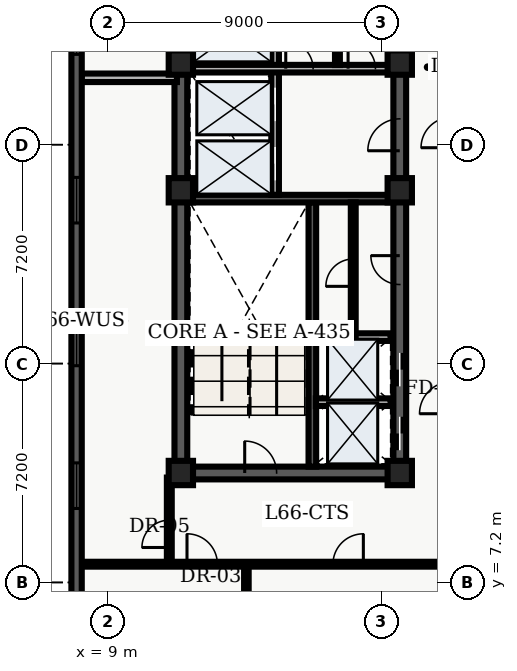
"""IFC4 building model, lengths in metres.
Left out: names, types, materials, properties, quantities, classifications, styles, units other than length and angle.
Written with IfcOpenShell. Run it as: python <this file> out.ifc"""

import sys

from ifc_helpers import new_model, entity, si_unit, converted_unit, direction, frame, origin_with_axes, origin_2d_with_axis, place, context, subcontext, project, spatial, polyline, rectangle, outline, extrude, element, fill, save


model = new_model("IFC4")
c1 = context("Model", 3, precision=1e-05, world=origin_with_axes(), true_north=direction((0.0, 1.0)))
c2 = subcontext(c1, "Body", "Model", "MODEL_VIEW")
j1 = project(units=[si_unit("LENGTHUNIT", "METRE"), converted_unit("PLANEANGLEUNIT", "DEGREE", entity("IfcPlaneAngleMeasure", 0.017), si_unit("PLANEANGLEUNIT", "RADIAN"), dimensions=[0, 0, 0, 0, 0, 0, 0])], contexts=[c1])
p1 = place(None, origin_with_axes())
s1 = spatial("IfcSite", under=j1, at=p1, CompositionType="ELEMENT")
p2 = place(p1, origin_with_axes())
s2 = spatial("IfcBuilding", under=s1, at=p2, CompositionType="ELEMENT")
p3 = place(p2, frame((0.0, 0.0, 268.5), z_axis=(0.0, 0.0, 1.0), x_axis=(1.0, 0.0, 0.0)))
s3 = spatial("IfcBuildingStorey", under=s2, at=p3, CompositionType="ELEMENT", Elevation=268.5)
p4 = place(p3, frame((11.4, 10.8, 0.0), z_axis=(0.0, 0.0, 1.0), x_axis=(0.0, 1.0, 0.0)))
e1 = element("IfcWall", 1, at=p4, inside=s3, PredefinedType="SHEAR", context=c2, shape_type="SweptSolid", body=[
    extrude(outline(polyline([(0.0, -0.21), (27.0, -0.21), (27.0, 0.21), (0.0, 0.21), (0.0, -0.21)])), origin_with_axes(), (0.0, 0.0, 1.0), 3.66),
])
p5 = place(p3, frame((11.4, 10.8, 0.0), z_axis=(0.0, 0.0, 1.0), x_axis=(1.0, 0.0, 0.0)))
e2 = element("IfcWall", 2, at=p5, inside=s3, PredefinedType="SHEAR", context=c2, shape_type="SweptSolid", body=[
    extrude(outline(polyline([(0.0, -0.21), (7.2, -0.21), (7.2, 0.21), (0.0, 0.21), (0.0, -0.21)])), origin_with_axes(), (0.0, 0.0, 1.0), 3.66),
])
p6 = place(p5, frame((2.625, 0.0, 0.0), z_axis=(0.0, 0.0, 1.0), x_axis=(1.0, 0.0, 0.0)))
e3 = element("IfcOpeningElement", 3, at=p6, cuts=e2, PredefinedType="OPENING", context=c2, shape_type="SweptSolid", body=[
    extrude(rectangle(XDim=1.05, YDim=0.44, at=origin_2d_with_axis()), origin_with_axes(), (0.0, 0.0, 1.0), 2.15),
])
p7 = place(p3, frame((18.6, 10.8, 0.0), z_axis=(0.0, 0.0, 1.0), x_axis=(0.0, 1.0, 0.0)))
e4 = element("IfcWall", 4, at=p7, inside=s3, PredefinedType="SHEAR", context=c2, shape_type="SweptSolid", body=[
    extrude(outline(polyline([(0.0, -0.21), (13.5, -0.21), (13.5, 0.21), (0.0, 0.21), (0.0, -0.21)])), origin_with_axes(), (0.0, 0.0, 1.0), 3.66),
])
p8 = place(p7, frame((1.3, 0.0, 0.0), z_axis=(0.0, 0.0, 1.0), x_axis=(1.0, 0.0, 0.0)))
e5 = element("IfcOpeningElement", 5, at=p8, cuts=e4, PredefinedType="OPENING", context=c2, shape_type="SweptSolid", body=[
    extrude(rectangle(XDim=1.1, YDim=0.44, at=origin_2d_with_axis()), origin_with_axes(), (0.0, 0.0, 1.0), 2.15),
])
p9 = place(p7, frame((3.4, 0.0, 0.0), z_axis=(0.0, 0.0, 1.0), x_axis=(1.0, 0.0, 0.0)))
e6 = element("IfcOpeningElement", 6, at=p9, cuts=e4, PredefinedType="OPENING", context=c2, shape_type="SweptSolid", body=[
    extrude(rectangle(XDim=1.1, YDim=0.44, at=origin_2d_with_axis()), origin_with_axes(), (0.0, 0.0, 1.0), 2.15),
])
p10 = place(p7, frame((11.125, 0.0, 0.0), z_axis=(0.0, 0.0, 1.0), x_axis=(1.0, 0.0, 0.0)))
e7 = element("IfcOpeningElement", 7, at=p10, cuts=e4, PredefinedType="OPENING", context=c2, shape_type="SweptSolid", body=[
    extrude(rectangle(XDim=1.05, YDim=0.44, at=origin_2d_with_axis()), origin_with_axes(), (0.0, 0.0, 1.0), 2.15),
])
p11 = place(p7, frame((6.675, 0.0, 0.0), z_axis=(0.0, 0.0, 1.0), x_axis=(1.0, 0.0, 0.0)))
e8 = element("IfcOpeningElement", 8, at=p11, cuts=e4, PredefinedType="OPENING", context=c2, shape_type="SweptSolid", body=[
    extrude(rectangle(XDim=0.95, YDim=0.44, at=origin_2d_with_axis()), origin_with_axes(), (0.0, 0.0, 1.0), 2.15),
])
p12 = place(p3, frame((18.6, 24.3, 0.0), z_axis=(0.0, 0.0, 1.0), x_axis=(0.0, 1.0, 0.0)))
e9 = element("IfcWall", 9, at=p12, inside=s3, PredefinedType="SHEAR", context=c2, shape_type="SweptSolid", body=[
    extrude(outline(polyline([(0.0, -0.21), (13.5, -0.21), (13.5, 0.21), (0.0, 0.21), (0.0, -0.21)])), origin_with_axes(), (0.0, 0.0, 1.0), 3.66),
])
p13 = place(p12, frame((6.725, 0.0, 0.0), z_axis=(0.0, 0.0, 1.0), x_axis=(1.0, 0.0, 0.0)))
e10 = element("IfcOpeningElement", 10, at=p13, cuts=e9, PredefinedType="OPENING", context=c2, shape_type="SweptSolid", body=[
    extrude(rectangle(XDim=1.05, YDim=0.44, at=origin_2d_with_axis()), origin_with_axes(), (0.0, 0.0, 1.0), 2.15),
])
p14 = place(p12, frame((11.125, 0.0, 0.0), z_axis=(0.0, 0.0, 1.0), x_axis=(1.0, 0.0, 0.0)))
e11 = element("IfcOpeningElement", 11, at=p14, cuts=e9, PredefinedType="OPENING", context=c2, shape_type="SweptSolid", body=[
    extrude(rectangle(XDim=1.05, YDim=0.44, at=origin_2d_with_axis()), origin_with_axes(), (0.0, 0.0, 1.0), 2.15),
])
p15 = place(p3, frame((15.725, 11.01, 0.0), z_axis=(0.0, 0.0, 1.0), x_axis=(0.0, 1.0, 0.0)))
e12 = element("IfcWall", 12, at=p15, inside=s3, PredefinedType="SHEAR", context=c2, shape_type="SweptSolid", body=[
    extrude(outline(polyline([(0.0, -0.125), (8.69, -0.125), (8.69, 0.125), (0.0, 0.125), (0.0, -0.125)])), origin_with_axes(), (0.0, 0.0, 1.0), 3.66),
])
p16 = place(p3, frame((11.61, 19.825, 0.0), z_axis=(0.0, 0.0, 1.0), x_axis=(1.0, 0.0, 0.0)))
e13 = element("IfcWall", 13, at=p16, inside=s3, PredefinedType="SHEAR", context=c2, shape_type="SweptSolid", body=[
    extrude(outline(polyline([(0.0, -0.125), (6.78, -0.125), (6.78, 0.125), (0.0, 0.125), (0.0, -0.125)])), origin_with_axes(), (0.0, 0.0, 1.0), 3.66),
])
p17 = place(p3, frame((14.5, 19.95, 0.0), z_axis=(0.0, 0.0, 1.0), x_axis=(0.0, 1.0, 0.0)))
e14 = element("IfcWall", 14, at=p17, inside=s3, PredefinedType="SOLIDWALL", context=c2, shape_type="SweptSolid", body=[
    extrude(outline(polyline([(0.0, -0.125), (6.25, -0.125), (6.25, 0.125), (0.0, 0.125), (0.0, -0.125)])), origin_with_axes(), (0.0, 0.0, 1.0), 2.7),
])
p18 = place(p17, frame((1.025, 0.0, 0.0), z_axis=(0.0, 0.0, 1.0), x_axis=(1.0, 0.0, 0.0)))
e15 = element("IfcOpeningElement", 15, at=p18, cuts=e14, PredefinedType="OPENING", context=c2, shape_type="SweptSolid", body=[
    extrude(rectangle(XDim=1.1, YDim=0.27, at=origin_2d_with_axis()), origin_with_axes(), (0.0, 0.0, 1.0), 2.15),
])
p19 = place(p17, frame((2.975, 0.0, 0.0), z_axis=(0.0, 0.0, 1.0), x_axis=(1.0, 0.0, 0.0)))
e16 = element("IfcOpeningElement", 16, at=p19, cuts=e14, PredefinedType="OPENING", context=c2, shape_type="SweptSolid", body=[
    extrude(rectangle(XDim=1.1, YDim=0.27, at=origin_2d_with_axis()), origin_with_axes(), (0.0, 0.0, 1.0), 2.15),
])
p20 = place(p17, frame((5.425, 0.0, 0.0), z_axis=(0.0, 0.0, 1.0), x_axis=(1.0, 0.0, 0.0)))
e17 = element("IfcOpeningElement", 17, at=p20, cuts=e14, PredefinedType="OPENING", context=c2, shape_type="SweptSolid", body=[
    extrude(rectangle(XDim=1.2, YDim=0.27, at=origin_2d_with_axis()), origin_with_axes(), (0.0, 0.0, 1.0), 2.15),
])
p21 = place(p3, frame((11.7, 24.1, 0.0), z_axis=(0.0, 0.0, 1.0), x_axis=(1.0, 0.0, 0.0)))
e18 = element("IfcWall", 18, at=p21, inside=s3, PredefinedType="SOLIDWALL", context=c2, shape_type="SweptSolid", body=[
    extrude(outline(polyline([(0.0, -0.125), (6.6, -0.125), (6.6, 0.125), (0.0, 0.125), (0.0, -0.125)])), origin_with_axes(), (0.0, 0.0, 1.0), 2.7),
])
p22 = place(p21, frame((3.6, 0.0, 0.0), z_axis=(0.0, 0.0, 1.0), x_axis=(1.0, 0.0, 0.0)))
e19 = element("IfcOpeningElement", 19, at=p22, cuts=e18, PredefinedType="OPENING", context=c2, shape_type="SweptSolid", body=[
    extrude(rectangle(XDim=0.9, YDim=0.27, at=origin_2d_with_axis()), origin_with_axes(), (0.0, 0.0, 1.0), 2.15),
])
p23 = place(p21, frame((5.65, 0.0, 0.0), z_axis=(0.0, 0.0, 1.0), x_axis=(1.0, 0.0, 0.0)))
e20 = element("IfcOpeningElement", 20, at=p23, cuts=e18, PredefinedType="OPENING", context=c2, shape_type="SweptSolid", body=[
    extrude(rectangle(XDim=0.9, YDim=0.27, at=origin_2d_with_axis()), origin_with_axes(), (0.0, 0.0, 1.0), 2.15),
])
for number, where, z_axis, x_axis in (
    (21, (11.4, 10.8, 0.0), (0.0, 0.0, 1.0), (1.0, 0.0, 0.0)),
    (22, (11.4, 20.1, 0.0), (0.0, 0.0, 1.0), (1.0, 0.0, 0.0)),
    (23, (11.4, 24.3, 0.0), (0.0, 0.0, 1.0), (1.0, 0.0, 0.0)),
    (24, (18.6, 10.8, 0.0), (0.0, 0.0, 1.0), (1.0, 0.0, 0.0)),
    (25, (18.6, 20.1, 0.0), (0.0, 0.0, 1.0), (1.0, 0.0, 0.0)),
    (26, (18.6, 24.3, 0.0), (0.0, 0.0, 1.0), (1.0, 0.0, 0.0)),
):
    element("IfcColumn", number, at=place(p3, frame(where, z_axis=z_axis, x_axis=x_axis)), inside=s3, PredefinedType="COLUMN", context=c2, shape_type="SweptSolid", body=[
        extrude(rectangle(XDim=0.8, YDim=0.8, at=origin_2d_with_axis()), origin_with_axes(), (0.0, 0.0, 1.0), 3.9),
    ])
p24 = place(p3, frame((16.55, 24.22, 0.0), z_axis=(0.0, 0.0, 1.0), x_axis=(0.0, 1.0, 0.0)))
e27 = element("IfcWall", 27, at=p24, inside=s3, PredefinedType="PARTITIONING", context=c2, shape_type="SweptSolid", body=[
    extrude(outline(polyline([(0.0, -0.08), (1.98, -0.08), (1.98, 0.08), (0.0, 0.08), (0.0, -0.08)])), origin_with_axes(), (0.0, 0.0, 1.0), 2.7),
])
for number, where, z_axis, x_axis in (
    (28, (15.84, 13.13, 0.0), (0.0, 0.0, 1.0), (1.0, 0.0, 0.0)),
    (29, (15.84, 15.27, 0.0), (0.0, 0.0, 1.0), (1.0, 0.0, 0.0)),
):
    element("IfcWall", number, at=place(p3, frame(where, z_axis=z_axis, x_axis=x_axis)), inside=s3, PredefinedType="SOLIDWALL", context=c2, shape_type="SweptSolid", body=[
        extrude(outline(polyline([(0.0, -0.125), (2.46, -0.125), (2.46, 0.125), (0.0, 0.125), (0.0, -0.125)])), origin_with_axes(), (0.0, 0.0, 1.0), 2.7),
    ])
p25 = place(p3, frame((17.07, 15.34, 0.0), z_axis=(0.0, 0.0, 1.0), x_axis=(0.0, 1.0, 0.0)))
e30 = element("IfcWall", 30, at=p25, inside=s3, PredefinedType="PARTITIONING", context=c2, shape_type="SweptSolid", body=[
    extrude(outline(polyline([(0.0, -0.08), (4.36, -0.08), (4.36, 0.08), (0.0, 0.08), (0.0, -0.08)])), origin_with_axes(), (0.0, 0.0, 1.0), 2.7),
])
p26 = place(p25, frame((2.05, 0.0, 0.0), z_axis=(0.0, 0.0, 1.0), x_axis=(1.0, 0.0, 0.0)))
e31 = element("IfcOpeningElement", 31, at=p26, cuts=e30, PredefinedType="OPENING", context=c2, shape_type="SweptSolid", body=[
    extrude(rectangle(XDim=0.9, YDim=0.18, at=origin_2d_with_axis()), origin_with_axes(), (0.0, 0.0, 1.0), 2.15),
])
p27 = place(p3, frame((8.135, 7.8, 0.0), z_axis=(0.0, 0.0, 1.0), x_axis=(1.0, 0.0, 0.0)))
e32 = element("IfcWall", 32, at=p27, inside=s3, PredefinedType="PARTITIONING", context=c2, shape_type="SweptSolid", body=[
    extrude(outline(polyline([(0.0, -0.08), (12.165, -0.08), (12.165, 0.08), (0.0, 0.08), (0.0, -0.08)])), origin_with_axes(), (0.0, 0.0, 1.0), 2.7),
])
p28 = place(p27, frame((3.967, 0.0, 0.0), z_axis=(0.0, 0.0, 1.0), x_axis=(1.0, 0.0, 0.0)))
e33 = element("IfcOpeningElement", 33, at=p28, cuts=e32, PredefinedType="OPENING", context=c2, shape_type="SweptSolid", body=[
    extrude(rectangle(XDim=1.0, YDim=0.18, at=origin_2d_with_axis()), origin_with_axes(), (0.0, 0.0, 1.0), 2.15),
])
p29 = place(p27, frame((8.768, 0.0, 0.0), z_axis=(0.0, 0.0, 1.0), x_axis=(1.0, 0.0, 0.0)))
e34 = element("IfcOpeningElement", 34, at=p29, cuts=e32, PredefinedType="OPENING", context=c2, shape_type="SweptSolid", body=[
    extrude(rectangle(XDim=1.0, YDim=0.18, at=origin_2d_with_axis()), origin_with_axes(), (0.0, 0.0, 1.0), 2.15),
])
p30 = place(p3, frame((11.02, 7.8, 0.0), z_axis=(0.0, 0.0, 1.0), x_axis=(0.0, 1.0, 0.0)))
e35 = element("IfcWall", 35, at=p30, inside=s3, PredefinedType="PARTITIONING", context=c2, shape_type="SweptSolid", body=[
    extrude(outline(polyline([(0.0, -0.08), (2.85, -0.08), (2.85, 0.08), (0.0, 0.08), (0.0, -0.08)])), origin_with_axes(), (0.0, 0.0, 1.0), 2.7),
])
p31 = place(p30, frame((1.0, 0.0, 0.0), z_axis=(0.0, 0.0, 1.0), x_axis=(1.0, 0.0, 0.0)))
e36 = element("IfcOpeningElement", 36, at=p31, cuts=e35, PredefinedType="OPENING", context=c2, shape_type="SweptSolid", body=[
    extrude(rectangle(XDim=0.9, YDim=0.18, at=origin_2d_with_axis()), origin_with_axes(), (0.0, 0.0, 1.0), 2.15),
])
p32 = place(p3, frame((8.135, 23.8, 0.0), z_axis=(0.0, 0.0, 1.0), x_axis=(1.0, 0.0, 0.0)))
e37 = element("IfcWall", 37, at=p32, inside=s3, PredefinedType="PARTITIONING", context=c2, shape_type="SweptSolid", body=[
    extrude(outline(polyline([(0.0, -0.14), (3.135, -0.14), (3.135, 0.14), (0.0, 0.14), (0.0, -0.14)])), origin_with_axes(), (0.0, 0.0, 1.0), 2.7),
])
p33 = place(p3, frame((13.555, 2.58, 0.0), z_axis=(0.0, 0.0, 1.0), x_axis=(0.0, 1.0, 0.0)))
e38 = element("IfcWall", 38, at=p33, inside=s3, PredefinedType="PARTITIONING", context=c2, shape_type="SweptSolid", body=[
    extrude(outline(polyline([(0.0, -0.075), (5.12, -0.075), (5.12, 0.075), (0.0, 0.075), (0.0, -0.075)])), origin_with_axes(), (0.0, 0.0, 1.0), 2.7),
])
p34 = place(p3, frame((7.97, 2.74, 0.0), z_axis=(0.0, 0.0, 1.0), x_axis=(0.0, 1.0, 0.0)))
e39 = element("IfcWall", 39, at=p34, inside=s3, PredefinedType="SOLIDWALL", context=c2, shape_type="SweptSolid", body=[
    extrude(outline(polyline([(0.0, -0.17), (43.46, -0.17), (43.46, 0.17), (0.0, 0.17), (0.0, -0.17)])), origin_with_axes(), (0.0, 0.0, 1.0), 3.66),
])
p35 = place(p34, frame((2.948, 0.0, 0.45), z_axis=(0.0, 0.0, 1.0), x_axis=(1.0, 0.0, 0.0)))
e40 = element("IfcOpeningElement", 40, at=p35, cuts=e39, PredefinedType="OPENING", context=c2, shape_type="SweptSolid", body=[
    extrude(rectangle(XDim=1.5, YDim=0.36, at=origin_2d_with_axis()), origin_with_axes(), (0.0, 0.0, 1.0), 2.1),
])
p36 = place(p34, frame((7.643, 0.0, 0.45), z_axis=(0.0, 0.0, 1.0), x_axis=(1.0, 0.0, 0.0)))
e41 = element("IfcOpeningElement", 41, at=p36, cuts=e39, PredefinedType="OPENING", context=c2, shape_type="SweptSolid", body=[
    extrude(rectangle(XDim=1.5, YDim=0.36, at=origin_2d_with_axis()), origin_with_axes(), (0.0, 0.0, 1.0), 2.1),
])
p37 = place(p34, frame((12.339, 0.0, 0.45), z_axis=(0.0, 0.0, 1.0), x_axis=(1.0, 0.0, 0.0)))
e42 = element("IfcOpeningElement", 42, at=p37, cuts=e39, PredefinedType="OPENING", context=c2, shape_type="SweptSolid", body=[
    extrude(rectangle(XDim=1.5, YDim=0.36, at=origin_2d_with_axis()), origin_with_axes(), (0.0, 0.0, 1.0), 2.1),
])
p38 = place(p34, frame((17.034, 0.0, 0.45), z_axis=(0.0, 0.0, 1.0), x_axis=(1.0, 0.0, 0.0)))
e43 = element("IfcOpeningElement", 43, at=p38, cuts=e39, PredefinedType="OPENING", context=c2, shape_type="SweptSolid", body=[
    extrude(rectangle(XDim=1.5, YDim=0.36, at=origin_2d_with_axis()), origin_with_axes(), (0.0, 0.0, 1.0), 2.1),
])
p39 = place(p34, frame((22.58, 0.0, 0.45), z_axis=(0.0, 0.0, 1.0), x_axis=(1.0, 0.0, 0.0)))
e44 = element("IfcOpeningElement", 44, at=p39, cuts=e39, PredefinedType="OPENING", context=c2, shape_type="SweptSolid", body=[
    extrude(rectangle(XDim=1.5, YDim=0.36, at=origin_2d_with_axis()), origin_with_axes(), (0.0, 0.0, 1.0), 2.1),
])
p40 = place(p34, frame((26.426, 0.0, 0.45), z_axis=(0.0, 0.0, 1.0), x_axis=(1.0, 0.0, 0.0)))
e45 = element("IfcOpeningElement", 45, at=p40, cuts=e39, PredefinedType="OPENING", context=c2, shape_type="SweptSolid", body=[
    extrude(rectangle(XDim=1.5, YDim=0.36, at=origin_2d_with_axis()), origin_with_axes(), (0.0, 0.0, 1.0), 2.1),
])
p41 = place(p34, frame((31.121, 0.0, 0.45), z_axis=(0.0, 0.0, 1.0), x_axis=(1.0, 0.0, 0.0)))
e46 = element("IfcOpeningElement", 46, at=p41, cuts=e39, PredefinedType="OPENING", context=c2, shape_type="SweptSolid", body=[
    extrude(rectangle(XDim=1.5, YDim=0.36, at=origin_2d_with_axis()), origin_with_axes(), (0.0, 0.0, 1.0), 2.1),
])
p42 = place(p34, frame((35.817, 0.0, 0.45), z_axis=(0.0, 0.0, 1.0), x_axis=(1.0, 0.0, 0.0)))
e47 = element("IfcOpeningElement", 47, at=p42, cuts=e39, PredefinedType="OPENING", context=c2, shape_type="SweptSolid", body=[
    extrude(rectangle(XDim=1.5, YDim=0.36, at=origin_2d_with_axis()), origin_with_axes(), (0.0, 0.0, 1.0), 2.1),
])
p43 = place(p34, frame((40.512, 0.0, 0.45), z_axis=(0.0, 0.0, 1.0), x_axis=(1.0, 0.0, 0.0)))
e48 = element("IfcOpeningElement", 48, at=p43, cuts=e39, PredefinedType="OPENING", context=c2, shape_type="SweptSolid", body=[
    extrude(rectangle(XDim=1.5, YDim=0.36, at=origin_2d_with_axis()), origin_with_axes(), (0.0, 0.0, 1.0), 2.1),
])
p44 = place(p7, frame((1.3, 0.0, 0.0), z_axis=(0.0, 0.0, 1.0), x_axis=(1.0, 0.0, 0.0)))
e49 = element("IfcDoor", 49, at=p44, inside=s3, OperationType="SLIDING_TO_LEFT", PredefinedType="DOOR", context=c2, shape_type="SweptSolid", body=[
    extrude(rectangle(XDim=1.1, YDim=0.09, at=origin_2d_with_axis()), origin_with_axes(), (0.0, 0.0, 1.0), 2.15),
])
fill(e5, e49)
p45 = place(p7, frame((3.4, 0.0, 0.0), z_axis=(0.0, 0.0, 1.0), x_axis=(1.0, 0.0, 0.0)))
e50 = element("IfcDoor", 50, at=p45, inside=s3, OperationType="SLIDING_TO_RIGHT", PredefinedType="DOOR", context=c2, shape_type="SweptSolid", body=[
    extrude(rectangle(XDim=1.1, YDim=0.09, at=origin_2d_with_axis()), origin_with_axes(), (0.0, 0.0, 1.0), 2.15),
])
fill(e6, e50)
p46 = place(p17, frame((1.025, 0.0, 0.0), z_axis=(0.0, 0.0, 1.0), x_axis=(1.0, 0.0, 0.0)))
e51 = element("IfcDoor", 51, at=p46, inside=s3, OperationType="SLIDING_TO_LEFT", PredefinedType="DOOR", context=c2, shape_type="SweptSolid", body=[
    extrude(rectangle(XDim=1.1, YDim=0.09, at=origin_2d_with_axis()), origin_with_axes(), (0.0, 0.0, 1.0), 2.15),
])
fill(e15, e51)
p47 = place(p17, frame((2.975, 0.0, 0.0), z_axis=(0.0, 0.0, 1.0), x_axis=(1.0, 0.0, 0.0)))
e52 = element("IfcDoor", 52, at=p47, inside=s3, OperationType="SLIDING_TO_RIGHT", PredefinedType="DOOR", context=c2, shape_type="SweptSolid", body=[
    extrude(rectangle(XDim=1.1, YDim=0.09, at=origin_2d_with_axis()), origin_with_axes(), (0.0, 0.0, 1.0), 2.15),
])
fill(e16, e52)
p48 = place(p5, frame((2.625, 0.0, 0.0), z_axis=(0.0, 0.0, 1.0), x_axis=(1.0, 0.0, 0.0)))
e53 = element("IfcDoor", 53, at=p48, inside=s3, OperationType="SINGLE_SWING_LEFT", PredefinedType="DOOR", context=c2, shape_type="SweptSolid", body=[
    extrude(rectangle(XDim=1.05, YDim=0.09, at=origin_2d_with_axis()), origin_with_axes(), (0.0, 0.0, 1.0), 2.15),
])
fill(e3, e53)
p49 = place(p7, frame((11.125, 0.0, 0.0), z_axis=(0.0, 0.0, 1.0), x_axis=(1.0, 0.0, 0.0)))
e54 = element("IfcDoor", 54, at=p49, inside=s3, OperationType="SINGLE_SWING_LEFT", PredefinedType="DOOR", context=c2, shape_type="SweptSolid", body=[
    extrude(rectangle(XDim=1.05, YDim=0.09, at=origin_2d_with_axis()), origin_with_axes(), (0.0, 0.0, 1.0), 2.15),
])
fill(e7, e54)
p50 = place(p21, frame((3.6, 0.0, 0.0), z_axis=(0.0, 0.0, 1.0), x_axis=(1.0, 0.0, 0.0)))
e55 = element("IfcDoor", 55, at=p50, inside=s3, OperationType="SINGLE_SWING_LEFT", PredefinedType="DOOR", context=c2, shape_type="SweptSolid", body=[
    extrude(rectangle(XDim=0.9, YDim=0.09, at=origin_2d_with_axis()), origin_with_axes(), (0.0, 0.0, 1.0), 2.15),
])
fill(e19, e55)
p51 = place(p21, frame((5.65, 0.0, 0.0), z_axis=(0.0, 0.0, 1.0), x_axis=(1.0, 0.0, 0.0)))
e56 = element("IfcDoor", 56, at=p51, inside=s3, OperationType="SINGLE_SWING_LEFT", PredefinedType="DOOR", context=c2, shape_type="SweptSolid", body=[
    extrude(rectangle(XDim=0.9, YDim=0.09, at=origin_2d_with_axis()), origin_with_axes(), (0.0, 0.0, 1.0), 2.15),
])
fill(e20, e56)
p52 = place(p25, frame((2.05, 0.0, 0.0), z_axis=(0.0, 0.0, 1.0), x_axis=(1.0, 0.0, 0.0)))
e57 = element("IfcDoor", 57, at=p52, inside=s3, OperationType="SINGLE_SWING_LEFT", PredefinedType="DOOR", context=c2, shape_type="SweptSolid", body=[
    extrude(rectangle(XDim=0.9, YDim=0.09, at=origin_2d_with_axis()), origin_with_axes(), (0.0, 0.0, 1.0), 2.15),
])
fill(e31, e57)
p53 = place(p7, frame((6.675, 0.0, 0.0), z_axis=(0.0, 0.0, 1.0), x_axis=(1.0, 0.0, 0.0)))
e58 = element("IfcDoor", 58, at=p53, inside=s3, OperationType="SINGLE_SWING_RIGHT", PredefinedType="DOOR", context=c2, shape_type="SweptSolid", body=[
    extrude(rectangle(XDim=0.95, YDim=0.09, at=origin_2d_with_axis()), origin_with_axes(), (0.0, 0.0, 1.0), 2.15),
])
fill(e8, e58)
p54 = place(p30, frame((1.0, 0.0, 0.0), z_axis=(0.0, 0.0, 1.0), x_axis=(1.0, 0.0, 0.0)))
e59 = element("IfcDoor", 59, at=p54, inside=s3, OperationType="SINGLE_SWING_LEFT", PredefinedType="DOOR", context=c2, shape_type="SweptSolid", body=[
    extrude(rectangle(XDim=0.9, YDim=0.09, at=origin_2d_with_axis()), origin_with_axes(), (0.0, 0.0, 1.0), 2.15),
])
fill(e36, e59)
p55 = place(p27, frame((3.967, 0.0, 0.0), z_axis=(0.0, 0.0, 1.0), x_axis=(1.0, 0.0, 0.0)))
e60 = element("IfcDoor", 60, at=p55, inside=s3, OperationType="SINGLE_SWING_LEFT", PredefinedType="DOOR", context=c2, shape_type="SweptSolid", body=[
    extrude(rectangle(XDim=1.0, YDim=0.09, at=origin_2d_with_axis()), origin_with_axes(), (0.0, 0.0, 1.0), 2.15),
])
fill(e33, e60)
p56 = place(p27, frame((8.768, 0.0, 0.0), z_axis=(0.0, 0.0, 1.0), x_axis=(1.0, 0.0, 0.0)))
e61 = element("IfcDoor", 61, at=p56, inside=s3, OperationType="SINGLE_SWING_RIGHT", PredefinedType="DOOR", context=c2, shape_type="SweptSolid", body=[
    extrude(rectangle(XDim=1.0, YDim=0.09, at=origin_2d_with_axis()), origin_with_axes(), (0.0, 0.0, 1.0), 2.15),
])
fill(e34, e61)
p57 = place(p34, frame((7.643, 0.0, 0.45), z_axis=(0.0, 0.0, 1.0), x_axis=(1.0, 0.0, 0.0)))
e62 = element("IfcWindow", 62, at=p57, inside=s3, PredefinedType="WINDOW", context=c2, shape_type="SweptSolid", body=[
    extrude(rectangle(XDim=1.5, YDim=0.09, at=origin_2d_with_axis()), origin_with_axes(), (0.0, 0.0, 1.0), 2.1),
])
fill(e41, e62)
p58 = place(p34, frame((12.339, 0.0, 0.45), z_axis=(0.0, 0.0, 1.0), x_axis=(1.0, 0.0, 0.0)))
e63 = element("IfcWindow", 63, at=p58, inside=s3, PredefinedType="WINDOW", context=c2, shape_type="SweptSolid", body=[
    extrude(rectangle(XDim=1.5, YDim=0.09, at=origin_2d_with_axis()), origin_with_axes(), (0.0, 0.0, 1.0), 2.1),
])
fill(e42, e63)
p59 = place(p34, frame((17.034, 0.0, 0.45), z_axis=(0.0, 0.0, 1.0), x_axis=(1.0, 0.0, 0.0)))
e64 = element("IfcWindow", 64, at=p59, inside=s3, PredefinedType="WINDOW", context=c2, shape_type="SweptSolid", body=[
    extrude(rectangle(XDim=1.5, YDim=0.09, at=origin_2d_with_axis()), origin_with_axes(), (0.0, 0.0, 1.0), 2.1),
])
fill(e43, e64)
p60 = place(p34, frame((22.58, 0.0, 0.45), z_axis=(0.0, 0.0, 1.0), x_axis=(1.0, 0.0, 0.0)))
e65 = element("IfcWindow", 65, at=p60, inside=s3, PredefinedType="WINDOW", context=c2, shape_type="SweptSolid", body=[
    extrude(rectangle(XDim=1.5, YDim=0.09, at=origin_2d_with_axis()), origin_with_axes(), (0.0, 0.0, 1.0), 2.1),
])
fill(e44, e65)
save(model, sys.argv[1])
